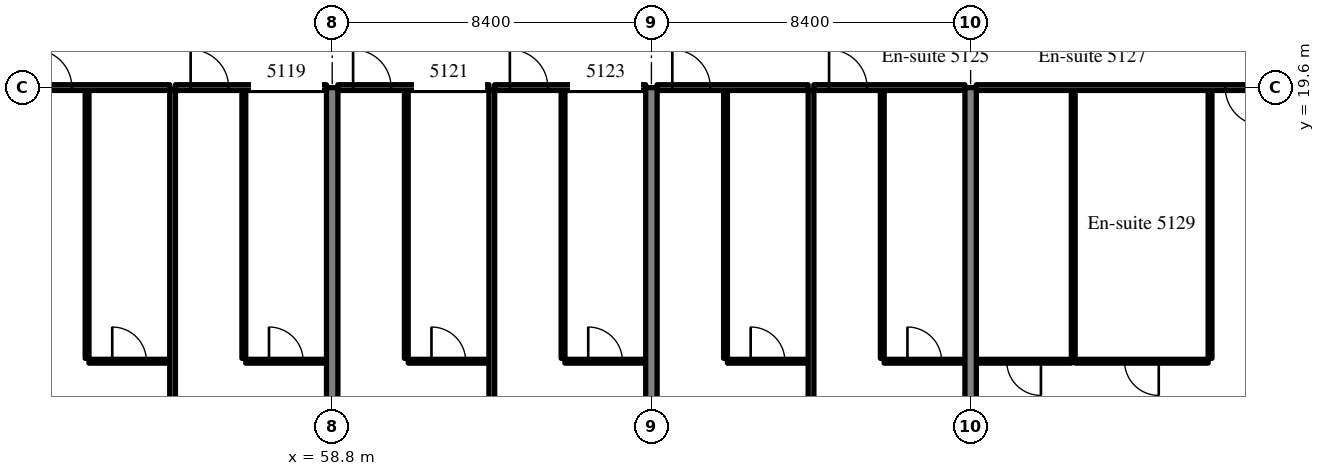
"""IFC4 building model, lengths in metres.
Left out: names, types, materials, properties, quantities, classifications, styles, units other than length and angle.
Written with IfcOpenShell. Run it as: python <this file> out.ifc"""

import sys

from ifc_helpers import new_model, si_unit, direction, frame, frame_2d, origin, place, context, subcontext, project, spatial, rectangle, extrude, source, transform, mapped, element, fill, save


model = new_model("IFC4")
c1 = context("Model", 3, precision=1e-05, world=origin(), true_north=direction((0.0, 1.0)))
c2 = subcontext(c1, "Body", "Model", "MODEL_VIEW")
j1 = project(units=[si_unit("LENGTHUNIT", "METRE"), si_unit("PLANEANGLEUNIT", "RADIAN")], contexts=[c1])
p1 = place(None, origin())
s1 = spatial("IfcSite", under=j1, at=p1, CompositionType="ELEMENT")
p2 = place(p1, origin())
s2 = spatial("IfcBuilding", under=s1, at=p2, CompositionType="ELEMENT")
p3 = place(p2, frame((0.0, 0.0, 214.0)))
s3 = spatial("IfcBuildingStorey", under=s2, at=p3, CompositionType="ELEMENT", Elevation=214.0)
m1 = source(origin(), c2, "Body", "SweptSolid", [
    extrude(rectangle(XDim=14.1, YDim=0.3, at=frame_2d((7.05, 0.0))), origin(), (0.0, 0.0, 1.0), 3.62),
])
for number, where, z_axis, x_axis in (
    (1, (58.8, 5.5, 0.0), (0.0, 0.0, 1.0), (0.0, 1.0, 0.0)),
    (2, (67.2, 5.5, 0.0), (0.0, 0.0, 1.0), (0.0, 1.0, 0.0)),
    (3, (75.6, 5.5, 0.0), (0.0, 0.0, 1.0), (0.0, 1.0, 0.0)),
):
    element("IfcWall", number, at=place(p3, frame(where, z_axis=z_axis, x_axis=x_axis)), inside=s3, PredefinedType="SHEAR", context=c2, shape_type="MappedRepresentation", body=[
        mapped(m1, transform((0.0, 0.0, 0.0), scale=1.0)),
    ])
m2 = source(origin(), c2, "Body", "SweptSolid", [
    extrude(rectangle(XDim=7.05, YDim=0.1, at=frame_2d((3.525, 0.0))), origin(), (0.0, 0.0, 1.0), 3.62),
])
p4 = place(p3, frame((52.35, 12.475, 0.0), z_axis=(0.0, 0.0, 1.0), x_axis=(0.0, 1.0, 0.0)))
e4 = element("IfcWall", 4, at=p4, inside=s3, PredefinedType="PARTITIONING", context=c2, shape_type="MappedRepresentation", body=[
    mapped(m2, transform((0.0, 0.0, 0.0), scale=1.0)),
])
m3 = source(origin(), c2, "Body", "SweptSolid", [
    extrude(rectangle(XDim=2.125, YDim=0.1, at=frame_2d((1.062, 0.0))), origin(), (0.0, 0.0, 1.0), 3.62),
])
p5 = place(p3, frame((52.4, 12.4, 0.0), z_axis=(0.0, 0.0, 1.0), x_axis=(1.0, 0.0, 0.0)))
e5 = element("IfcWall", 5, at=p5, inside=s3, PredefinedType="PARTITIONING", context=c2, shape_type="MappedRepresentation", body=[
    mapped(m3, transform((0.0, 0.0, 0.0), scale=1.0)),
])
m4 = source(origin(), c2, "Body", "SweptSolid", [
    extrude(rectangle(XDim=0.9, YDim=2.1, at=frame_2d((0.45, 1.05))), frame((0.0, 0.06, 0.0), z_axis=(0.0, -1.0, 0.0), x_axis=(1.0, 0.0, 0.0)), (0.0, 0.0, 1.0), 0.12),
])
p6 = place(p5, frame((0.612, 0.0, 0.0)))
e6 = element("IfcOpeningElement", 6, at=p6, cuts=e5, PredefinedType="OPENING", context=c2, shape_type="MappedRepresentation", body=[
    mapped(m4, transform((0.0, 0.0, 0.0), scale=1.0)),
])
m5 = source(origin(), c2, "Body", "SweptSolid", [
    extrude(rectangle(XDim=3.975, YDim=0.15, at=frame_2d((1.987, 0.0))), origin(), (0.0, 0.0, 1.0), 2.92),
])
p7 = place(p3, frame((50.55, 19.6, 0.0), z_axis=(0.0, 0.0, 1.0), x_axis=(1.0, 0.0, 0.0)))
e7 = element("IfcWall", 7, at=p7, inside=s3, PredefinedType="PARTITIONING", context=c2, shape_type="MappedRepresentation", body=[
    mapped(m5, transform((0.0, 0.0, 0.0), scale=1.0)),
])
m6 = source(origin(), c2, "Body", "SweptSolid", [
    extrude(rectangle(XDim=1.0, YDim=2.1, at=frame_2d((0.5, 1.05))), frame((0.0, 0.085, 0.0), z_axis=(0.0, -1.0, 0.0), x_axis=(1.0, 0.0, 0.0)), (0.0, 0.0, 1.0), 0.17),
])
p8 = place(p7, frame((0.4, 0.0, 0.0)))
e8 = element("IfcOpeningElement", 8, at=p8, cuts=e7, PredefinedType="OPENING", context=c2, shape_type="MappedRepresentation", body=[
    mapped(m6, transform((0.0, 0.0, 0.0), scale=1.0)),
])
p9 = place(p3, frame((56.475, 12.475, 0.0), z_axis=(0.0, 0.0, 1.0), x_axis=(0.0, 1.0, 0.0)))
e9 = element("IfcWall", 9, at=p9, inside=s3, PredefinedType="PARTITIONING", context=c2, shape_type="MappedRepresentation", body=[
    mapped(m2, transform((0.0, 0.0, 0.0), scale=1.0)),
])
p10 = place(p3, frame((56.525, 12.4, 0.0), z_axis=(0.0, 0.0, 1.0), x_axis=(1.0, 0.0, 0.0)))
e10 = element("IfcWall", 10, at=p10, inside=s3, PredefinedType="PARTITIONING", context=c2, shape_type="MappedRepresentation", body=[
    mapped(m3, transform((0.0, 0.0, 0.0), scale=1.0)),
])
p11 = place(p10, frame((0.612, 0.0, 0.0)))
e11 = element("IfcOpeningElement", 11, at=p11, cuts=e10, PredefinedType="OPENING", context=c2, shape_type="MappedRepresentation", body=[
    mapped(m4, transform((0.0, 0.0, 0.0), scale=1.0)),
])
p12 = place(p3, frame((54.675, 19.6, 0.0), z_axis=(0.0, 0.0, 1.0), x_axis=(1.0, 0.0, 0.0)))
e12 = element("IfcWall", 12, at=p12, inside=s3, PredefinedType="PARTITIONING", context=c2, shape_type="MappedRepresentation", body=[
    mapped(m5, transform((0.0, 0.0, 0.0), scale=1.0)),
])
p13 = place(p12, frame((0.4, 0.0, 0.0)))
e13 = element("IfcOpeningElement", 13, at=p13, cuts=e12, PredefinedType="OPENING", context=c2, shape_type="MappedRepresentation", body=[
    mapped(m6, transform((0.0, 0.0, 0.0), scale=1.0)),
])
m7 = source(origin(), c2, "Body", "SweptSolid", [
    extrude(rectangle(XDim=14.906, YDim=0.15, at=frame_2d((7.453, 0.0))), origin(), (0.0, 0.0, 1.0), 3.62),
])
p14 = place(p3, frame((54.6, 4.619, 0.0), z_axis=(0.0, 0.0, 1.0), x_axis=(0.0, 1.0, 0.0)))
e14 = element("IfcWall", 14, at=p14, inside=s3, PredefinedType="PARTITIONING", context=c2, shape_type="MappedRepresentation", body=[
    mapped(m7, transform((0.0, 0.0, 0.0), scale=1.0)),
])
p15 = place(p3, frame((60.75, 12.475, 0.0), z_axis=(0.0, 0.0, 1.0), x_axis=(0.0, 1.0, 0.0)))
e15 = element("IfcWall", 15, at=p15, inside=s3, PredefinedType="PARTITIONING", context=c2, shape_type="MappedRepresentation", body=[
    mapped(m2, transform((0.0, 0.0, 0.0), scale=1.0)),
])
p16 = place(p3, frame((60.8, 12.4, 0.0), z_axis=(0.0, 0.0, 1.0), x_axis=(1.0, 0.0, 0.0)))
e16 = element("IfcWall", 16, at=p16, inside=s3, PredefinedType="PARTITIONING", context=c2, shape_type="MappedRepresentation", body=[
    mapped(m3, transform((0.0, 0.0, 0.0), scale=1.0)),
])
p17 = place(p16, frame((0.612, 0.0, 0.0)))
e17 = element("IfcOpeningElement", 17, at=p17, cuts=e16, PredefinedType="OPENING", context=c2, shape_type="MappedRepresentation", body=[
    mapped(m4, transform((0.0, 0.0, 0.0), scale=1.0)),
])
m8 = source(origin(), c2, "Body", "SweptSolid", [
    extrude(rectangle(XDim=3.975, YDim=0.15, at=frame_2d((1.988, 0.0))), origin(), (0.0, 0.0, 1.0), 2.92),
])
p18 = place(p3, frame((58.95, 19.6, 0.0), z_axis=(0.0, 0.0, 1.0), x_axis=(1.0, 0.0, 0.0)))
e18 = element("IfcWall", 18, at=p18, inside=s3, PredefinedType="PARTITIONING", context=c2, shape_type="MappedRepresentation", body=[
    mapped(m8, transform((0.0, 0.0, 0.0), scale=1.0)),
])
p19 = place(p18, frame((0.4, 0.0, 0.0)))
e19 = element("IfcOpeningElement", 19, at=p19, cuts=e18, PredefinedType="OPENING", context=c2, shape_type="MappedRepresentation", body=[
    mapped(m6, transform((0.0, 0.0, 0.0), scale=1.0)),
])
p20 = place(p3, frame((64.875, 12.475, 0.0), z_axis=(0.0, 0.0, 1.0), x_axis=(0.0, 1.0, 0.0)))
e20 = element("IfcWall", 20, at=p20, inside=s3, PredefinedType="PARTITIONING", context=c2, shape_type="MappedRepresentation", body=[
    mapped(m2, transform((0.0, 0.0, 0.0), scale=1.0)),
])
p21 = place(p3, frame((64.925, 12.4, 0.0), z_axis=(0.0, 0.0, 1.0), x_axis=(1.0, 0.0, 0.0)))
e21 = element("IfcWall", 21, at=p21, inside=s3, PredefinedType="PARTITIONING", context=c2, shape_type="MappedRepresentation", body=[
    mapped(m3, transform((0.0, 0.0, 0.0), scale=1.0)),
])
p22 = place(p21, frame((0.612, 0.0, 0.0)))
e22 = element("IfcOpeningElement", 22, at=p22, cuts=e21, PredefinedType="OPENING", context=c2, shape_type="MappedRepresentation", body=[
    mapped(m4, transform((0.0, 0.0, 0.0), scale=1.0)),
])
p23 = place(p3, frame((63.075, 19.6, 0.0), z_axis=(0.0, 0.0, 1.0), x_axis=(1.0, 0.0, 0.0)))
e23 = element("IfcWall", 23, at=p23, inside=s3, PredefinedType="PARTITIONING", context=c2, shape_type="MappedRepresentation", body=[
    mapped(m8, transform((0.0, 0.0, 0.0), scale=1.0)),
])
p24 = place(p23, frame((0.4, 0.0, 0.0)))
e24 = element("IfcOpeningElement", 24, at=p24, cuts=e23, PredefinedType="OPENING", context=c2, shape_type="MappedRepresentation", body=[
    mapped(m6, transform((0.0, 0.0, 0.0), scale=1.0)),
])
m9 = source(origin(), c2, "Body", "SweptSolid", [
    extrude(rectangle(XDim=15.498, YDim=0.15, at=frame_2d((7.749, 0.0))), origin(), (0.0, 0.0, 1.0), 3.62),
])
p25 = place(p3, frame((63.0, 4.027, 0.0), z_axis=(0.0, 0.0, 1.0), x_axis=(0.0, 1.0, 0.0)))
e25 = element("IfcWall", 25, at=p25, inside=s3, PredefinedType="PARTITIONING", context=c2, shape_type="MappedRepresentation", body=[
    mapped(m9, transform((0.0, 0.0, 0.0), scale=1.0)),
])
p26 = place(p3, frame((69.15, 12.475, 0.0), z_axis=(0.0, 0.0, 1.0), x_axis=(0.0, 1.0, 0.0)))
e26 = element("IfcWall", 26, at=p26, inside=s3, PredefinedType="PARTITIONING", context=c2, shape_type="MappedRepresentation", body=[
    mapped(m2, transform((0.0, 0.0, 0.0), scale=1.0)),
])
p27 = place(p3, frame((69.2, 12.4, 0.0), z_axis=(0.0, 0.0, 1.0), x_axis=(1.0, 0.0, 0.0)))
e27 = element("IfcWall", 27, at=p27, inside=s3, PredefinedType="PARTITIONING", context=c2, shape_type="MappedRepresentation", body=[
    mapped(m3, transform((0.0, 0.0, 0.0), scale=1.0)),
])
p28 = place(p27, frame((0.612, 0.0, 0.0)))
e28 = element("IfcOpeningElement", 28, at=p28, cuts=e27, PredefinedType="OPENING", context=c2, shape_type="MappedRepresentation", body=[
    mapped(m4, transform((0.0, 0.0, 0.0), scale=1.0)),
])
p29 = place(p3, frame((67.35, 19.6, 0.0), z_axis=(0.0, 0.0, 1.0), x_axis=(1.0, 0.0, 0.0)))
e29 = element("IfcWall", 29, at=p29, inside=s3, PredefinedType="PARTITIONING", context=c2, shape_type="MappedRepresentation", body=[
    mapped(m5, transform((0.0, 0.0, 0.0), scale=1.0)),
])
p30 = place(p29, frame((0.4, 0.0, 0.0)))
e30 = element("IfcOpeningElement", 30, at=p30, cuts=e29, PredefinedType="OPENING", context=c2, shape_type="MappedRepresentation", body=[
    mapped(m6, transform((0.0, 0.0, 0.0), scale=1.0)),
])
p31 = place(p3, frame((73.275, 12.475, 0.0), z_axis=(0.0, 0.0, 1.0), x_axis=(0.0, 1.0, 0.0)))
e31 = element("IfcWall", 31, at=p31, inside=s3, PredefinedType="PARTITIONING", context=c2, shape_type="MappedRepresentation", body=[
    mapped(m2, transform((0.0, 0.0, 0.0), scale=1.0)),
])
p32 = place(p3, frame((73.325, 12.4, 0.0), z_axis=(0.0, 0.0, 1.0), x_axis=(1.0, 0.0, 0.0)))
e32 = element("IfcWall", 32, at=p32, inside=s3, PredefinedType="PARTITIONING", context=c2, shape_type="MappedRepresentation", body=[
    mapped(m3, transform((0.0, 0.0, 0.0), scale=1.0)),
])
p33 = place(p32, frame((0.612, 0.0, 0.0)))
e33 = element("IfcOpeningElement", 33, at=p33, cuts=e32, PredefinedType="OPENING", context=c2, shape_type="MappedRepresentation", body=[
    mapped(m4, transform((0.0, 0.0, 0.0), scale=1.0)),
])
p34 = place(p3, frame((71.475, 19.6, 0.0), z_axis=(0.0, 0.0, 1.0), x_axis=(1.0, 0.0, 0.0)))
e34 = element("IfcWall", 34, at=p34, inside=s3, PredefinedType="PARTITIONING", context=c2, shape_type="MappedRepresentation", body=[
    mapped(m5, transform((0.0, 0.0, 0.0), scale=1.0)),
])
p35 = place(p34, frame((0.4, 0.0, 0.0)))
e35 = element("IfcOpeningElement", 35, at=p35, cuts=e34, PredefinedType="OPENING", context=c2, shape_type="MappedRepresentation", body=[
    mapped(m6, transform((0.0, 0.0, 0.0), scale=1.0)),
])
m10 = source(origin(), c2, "Body", "SweptSolid", [
    extrude(rectangle(XDim=12.275, YDim=0.15, at=frame_2d((6.137, 0.0))), origin(), (0.0, 0.0, 1.0), 3.62),
])
p36 = place(p3, frame((71.4, 7.25, 0.0), z_axis=(0.0, 0.0, 1.0), x_axis=(0.0, 1.0, 0.0)))
e36 = element("IfcWall", 36, at=p36, inside=s3, PredefinedType="PARTITIONING", context=c2, shape_type="MappedRepresentation", body=[
    mapped(m10, transform((0.0, 0.0, 0.0), scale=1.0)),
])
for number, where, z_axis, x_axis in (
    (37, (81.9, 12.475, 0.0), (0.0, 0.0, 1.0), (0.0, 1.0, 0.0)),
    (38, (78.3, 12.475, 0.0), (0.0, 0.0, 1.0), (0.0, 1.0, 0.0)),
):
    element("IfcWall", number, at=place(p3, frame(where, z_axis=z_axis, x_axis=x_axis)), inside=s3, PredefinedType="PARTITIONING", context=c2, shape_type="MappedRepresentation", body=[
        mapped(m2, transform((0.0, 0.0, 0.0), scale=1.0)),
    ])
m11 = source(origin(), c2, "Body", "SweptSolid", [
    extrude(rectangle(XDim=3.5, YDim=0.1, at=frame_2d((1.75, 0.0))), origin(), (0.0, 0.0, 1.0), 3.62),
])
p37 = place(p3, frame((78.35, 12.4, 0.0), z_axis=(0.0, 0.0, 1.0), x_axis=(1.0, 0.0, 0.0)))
e39 = element("IfcWall", 39, at=p37, inside=s3, PredefinedType="PARTITIONING", context=c2, shape_type="MappedRepresentation", body=[
    mapped(m11, transform((0.0, 0.0, 0.0), scale=1.0)),
])
p38 = place(p37, frame((1.3, 0.0, 0.0)))
e40 = element("IfcOpeningElement", 40, at=p38, cuts=e39, PredefinedType="OPENING", context=c2, shape_type="MappedRepresentation", body=[
    mapped(m4, transform((0.0, 0.0, 0.0), scale=1.0)),
])
m12 = source(origin(), c2, "Body", "SweptSolid", [
    extrude(rectangle(XDim=2.5, YDim=0.1, at=frame_2d((1.25, 0.0))), origin(), (0.0, 0.0, 1.0), 3.62),
])
p39 = place(p3, frame((75.75, 12.4, 0.0), z_axis=(0.0, 0.0, 1.0), x_axis=(1.0, 0.0, 0.0)))
e41 = element("IfcWall", 41, at=p39, inside=s3, PredefinedType="PARTITIONING", context=c2, shape_type="MappedRepresentation", body=[
    mapped(m12, transform((0.0, 0.0, 0.0), scale=1.0)),
])
p40 = place(p39, frame((0.8, 0.0, 0.0)))
e42 = element("IfcOpeningElement", 42, at=p40, cuts=e41, PredefinedType="OPENING", context=c2, shape_type="MappedRepresentation", body=[
    mapped(m4, transform((0.0, 0.0, 0.0), scale=1.0)),
])
m13 = source(origin(), c2, "Body", "SweptSolid", [
    extrude(rectangle(XDim=7.95, YDim=0.15, at=frame_2d((3.975, 0.0))), origin(), (0.0, 0.0, 1.0), 2.92),
])
p41 = place(p3, frame((75.75, 19.6, 0.0), z_axis=(0.0, 0.0, 1.0), x_axis=(1.0, 0.0, 0.0)))
e43 = element("IfcWall", 43, at=p41, inside=s3, PredefinedType="PARTITIONING", context=c2, shape_type="MappedRepresentation", body=[
    mapped(m13, transform((0.0, 0.0, 0.0), scale=1.0)),
])
p42 = place(p41, frame((6.55, 0.0, 0.0)))
e44 = element("IfcOpeningElement", 44, at=p42, cuts=e43, PredefinedType="OPENING", context=c2, shape_type="MappedRepresentation", body=[
    mapped(m6, transform((0.0, 0.0, 0.0), scale=1.0)),
])
m14 = source(origin(), c2, "Body", "SweptSolid", [
    extrude(rectangle(XDim=0.9, YDim=2.1, at=frame_2d((0.45, 1.05))), frame((0.0, 0.025, 0.0), z_axis=(0.0, -1.0, 0.0), x_axis=(1.0, 0.0, 0.0)), (0.0, 0.0, 1.0), 0.05),
])
p43 = place(p6, origin())
e45 = element("IfcDoor", 45, at=p43, inside=s3, OperationType="SINGLE_SWING_LEFT", PredefinedType="DOOR", context=c2, shape_type="MappedRepresentation", body=[
    mapped(m14, transform((0.0, 0.0, 0.0), scale=1.0)),
])
fill(e6, e45)
m15 = source(origin(), c2, "Body", "SweptSolid", [
    extrude(rectangle(XDim=1.0, YDim=2.1, at=frame_2d((0.5, 1.05))), frame((0.0, 0.025, 0.0), z_axis=(0.0, -1.0, 0.0), x_axis=(1.0, 0.0, 0.0)), (0.0, 0.0, 1.0), 0.05),
])
p44 = place(p8, origin())
e46 = element("IfcDoor", 46, at=p44, inside=s3, OperationType="SINGLE_SWING_LEFT", PredefinedType="DOOR", context=c2, shape_type="MappedRepresentation", body=[
    mapped(m15, transform((0.0, 0.0, 0.0), scale=1.0)),
])
fill(e8, e46)
p45 = place(p11, origin())
e47 = element("IfcDoor", 47, at=p45, inside=s3, OperationType="SINGLE_SWING_LEFT", PredefinedType="DOOR", context=c2, shape_type="MappedRepresentation", body=[
    mapped(m14, transform((0.0, 0.0, 0.0), scale=1.0)),
])
fill(e11, e47)
p46 = place(p13, origin())
e48 = element("IfcDoor", 48, at=p46, inside=s3, OperationType="SINGLE_SWING_LEFT", PredefinedType="DOOR", context=c2, shape_type="MappedRepresentation", body=[
    mapped(m15, transform((0.0, 0.0, 0.0), scale=1.0)),
])
fill(e13, e48)
p47 = place(p17, origin())
e49 = element("IfcDoor", 49, at=p47, inside=s3, OperationType="SINGLE_SWING_LEFT", PredefinedType="DOOR", context=c2, shape_type="MappedRepresentation", body=[
    mapped(m14, transform((0.0, 0.0, 0.0), scale=1.0)),
])
fill(e17, e49)
p48 = place(p19, origin())
e50 = element("IfcDoor", 50, at=p48, inside=s3, OperationType="SINGLE_SWING_LEFT", PredefinedType="DOOR", context=c2, shape_type="MappedRepresentation", body=[
    mapped(m15, transform((0.0, 0.0, 0.0), scale=1.0)),
])
fill(e19, e50)
p49 = place(p22, origin())
e51 = element("IfcDoor", 51, at=p49, inside=s3, OperationType="SINGLE_SWING_LEFT", PredefinedType="DOOR", context=c2, shape_type="MappedRepresentation", body=[
    mapped(m14, transform((0.0, 0.0, 0.0), scale=1.0)),
])
fill(e22, e51)
p50 = place(p24, origin())
e52 = element("IfcDoor", 52, at=p50, inside=s3, OperationType="SINGLE_SWING_LEFT", PredefinedType="DOOR", context=c2, shape_type="MappedRepresentation", body=[
    mapped(m15, transform((0.0, 0.0, 0.0), scale=1.0)),
])
fill(e24, e52)
p51 = place(p28, origin())
e53 = element("IfcDoor", 53, at=p51, inside=s3, OperationType="SINGLE_SWING_LEFT", PredefinedType="DOOR", context=c2, shape_type="MappedRepresentation", body=[
    mapped(m14, transform((0.0, 0.0, 0.0), scale=1.0)),
])
fill(e28, e53)
p52 = place(p30, origin())
e54 = element("IfcDoor", 54, at=p52, inside=s3, OperationType="SINGLE_SWING_LEFT", PredefinedType="DOOR", context=c2, shape_type="MappedRepresentation", body=[
    mapped(m15, transform((0.0, 0.0, 0.0), scale=1.0)),
])
fill(e30, e54)
p53 = place(p33, origin())
e55 = element("IfcDoor", 55, at=p53, inside=s3, OperationType="SINGLE_SWING_LEFT", PredefinedType="DOOR", context=c2, shape_type="MappedRepresentation", body=[
    mapped(m14, transform((0.0, 0.0, 0.0), scale=1.0)),
])
fill(e33, e55)
p54 = place(p35, origin())
e56 = element("IfcDoor", 56, at=p54, inside=s3, OperationType="SINGLE_SWING_LEFT", PredefinedType="DOOR", context=c2, shape_type="MappedRepresentation", body=[
    mapped(m15, transform((0.0, 0.0, 0.0), scale=1.0)),
])
fill(e35, e56)
p55 = place(p38, origin())
e57 = element("IfcDoor", 57, at=p55, inside=s3, OperationType="SINGLE_SWING_RIGHT", PredefinedType="DOOR", context=c2, shape_type="MappedRepresentation", body=[
    mapped(m14, transform((0.0, 0.0, 0.0), scale=1.0)),
])
fill(e40, e57)
p56 = place(p40, origin())
e58 = element("IfcDoor", 58, at=p56, inside=s3, OperationType="SINGLE_SWING_RIGHT", PredefinedType="DOOR", context=c2, shape_type="MappedRepresentation", body=[
    mapped(m14, transform((0.0, 0.0, 0.0), scale=1.0)),
])
fill(e42, e58)
p57 = place(p42, origin())
e59 = element("IfcDoor", 59, at=p57, inside=s3, OperationType="SINGLE_SWING_RIGHT", PredefinedType="DOOR", context=c2, shape_type="MappedRepresentation", body=[
    mapped(m15, transform((0.0, 0.0, 0.0), scale=1.0)),
])
fill(e44, e59)
save(model, sys.argv[1])
